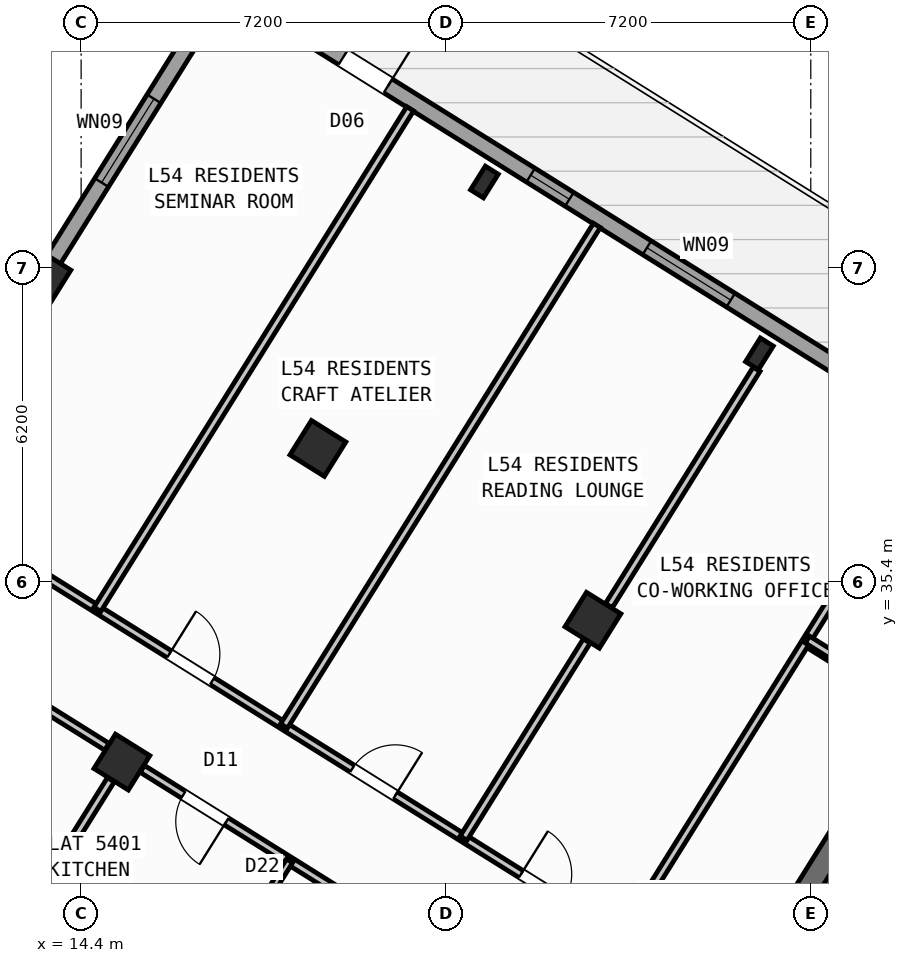
"""IFC4 building model, lengths in metres.
Left out: names, types, materials, properties, quantities, classifications, styles, units other than length and angle.
Written with IfcOpenShell. Run it as: python <this file> out.ifc"""

import sys

from ifc_helpers import new_model, si_unit, direction, frame, frame_2d, origin, origin_2d, place, context, subcontext, project, spatial, rectangle, hollow_rectangle, i_section, extrude, source, transform, mapped, element, fill, save


model = new_model("IFC4")
c1 = context("Model", 3, precision=1e-05, world=origin(), true_north=direction((0.0, 1.0)))
c2 = subcontext(c1, "Body", "Model", "MODEL_VIEW")
j1 = project(units=[si_unit("LENGTHUNIT", "METRE"), si_unit("PLANEANGLEUNIT", "RADIAN")], contexts=[c1])
p1 = place(None, origin())
s1 = spatial("IfcSite", under=j1, at=p1, CompositionType="ELEMENT")
p2 = place(p1, origin())
s2 = spatial("IfcBuilding", under=s1, at=p2, CompositionType="ELEMENT")
p3 = place(p2, frame((0.0, 0.0, 214.8)))
s3 = spatial("IfcBuildingStorey", under=s2, at=p3, CompositionType="ELEMENT", Elevation=214.8)
p4 = place(p3, frame((29.544, 30.636, 0.0), z_axis=(0.0, 0.0, 1.0), x_axis=(-0.529902075036, -0.848058836916, 0.0)))
e1 = element("IfcWall", 1, at=p4, inside=s3, PredefinedType="SHEAR", context=c2, shape_type="SweptSolid", body=[
    extrude(rectangle(XDim=3.625, YDim=0.45, at=frame_2d((1.812, 0.0))), origin(), (0.0, 0.0, 1.0), 3.35),
])
m1 = source(origin(), c2, "Body", "SweptSolid", [
    extrude(i_section(OverallWidth=0.3, OverallDepth=0.55, WebThickness=0.015, FlangeThickness=0.029, at=origin_2d()), origin(), (0.0, 0.0, 1.0), 3.6),
])
p5 = place(p3, frame((27.786, 39.901, 0.0), z_axis=(0.0, 0.0, 1.0), x_axis=(-0.848048096156, 0.529919264233, 0.0)))
e2 = element("IfcColumn", 2, at=p5, inside=s3, PredefinedType="COLUMN", context=c2, shape_type="MappedRepresentation", body=[
    mapped(m1, transform((0.0, 0.0, 0.0), scale=1.0)),
])
m2 = source(origin(), c2, "Body", "SweptSolid", [
    extrude(hollow_rectangle(XDim=0.8, YDim=0.8, WallThickness=0.032, at=origin_2d()), origin(), (0.0, 0.0, 1.0), 3.6),
])
p6 = place(p3, frame((24.5, 34.643, 0.0), z_axis=(0.0, 0.0, 1.0), x_axis=(-0.848048096156, 0.529919264233, 0.0)))
e3 = element("IfcColumn", 3, at=p6, inside=s3, PredefinedType="COLUMN", context=c2, shape_type="MappedRepresentation", body=[
    mapped(m2, transform((0.0, 0.0, 0.0), scale=1.0)),
])
p7 = place(p3, frame((22.358, 43.292, 0.0), z_axis=(0.0, 0.0, 1.0), x_axis=(-0.848048096156, 0.529919264233, 0.0)))
e4 = element("IfcColumn", 4, at=p7, inside=s3, PredefinedType="COLUMN", context=c2, shape_type="MappedRepresentation", body=[
    mapped(m1, transform((0.0, 0.0, 0.0), scale=1.0)),
])
for number, where, z_axis, x_axis in (
    (5, (19.073, 38.034, 0.0), (0.0, 0.0, 1.0), (-0.848, 0.53, 0.0)),
    (6, (15.205, 31.844, 0.0), (0.0, 0.0, 1.0), (-0.848, 0.53, 0.0)),
    (7, (13.646, 41.426, 0.0), (0.0, 0.0, 1.0), (-0.848, 0.53, 0.0)),
):
    element("IfcColumn", number, at=place(p3, frame(where, z_axis=z_axis, x_axis=x_axis)), inside=s3, PredefinedType="COLUMN", context=c2, shape_type="MappedRepresentation", body=[
        mapped(m2, transform((0.0, 0.0, 0.0), scale=1.0)),
    ])
p8 = place(p3, frame((5.7, 28.71, 0.0), z_axis=(0.0, 0.0, 1.0), x_axis=(0.529923711467, 0.8480453172, 0.0)))
e8 = element("IfcWall", 8, at=p8, inside=s3, PredefinedType="STANDARD", context=c2, shape_type="SweptSolid", body=[
    extrude(rectangle(XDim=21.587, YDim=0.32, at=frame_2d((10.794, 0.0))), origin(), (0.0, 0.0, 1.0), 2.825),
])
p9 = place(p8, frame((2.184, 0.0, 0.9)))
e9 = element("IfcOpeningElement", 9, at=p9, cuts=e8, PredefinedType="OPENING", context=c2, shape_type="SweptSolid", body=[
    extrude(rectangle(XDim=1.65, YDim=1.45, at=frame_2d((0.825, 0.725))), frame((0.0, 0.17, 0.0), z_axis=(0.0, -1.0, 0.0), x_axis=(1.0, 0.0, 0.0)), (0.0, 0.0, 1.0), 0.34),
])
p10 = place(p8, frame((11.709, 0.0, 0.9)))
e10 = element("IfcOpeningElement", 10, at=p10, cuts=e8, PredefinedType="OPENING", context=c2, shape_type="SweptSolid", body=[
    extrude(rectangle(XDim=1.35, YDim=1.45, at=frame_2d((0.675, 0.725))), frame((0.0, 0.17, 0.0), z_axis=(0.0, -1.0, 0.0), x_axis=(1.0, 0.0, 0.0)), (0.0, 0.0, 1.0), 0.34),
])
p11 = place(p8, frame((17.181, 0.0, 0.95)))
e11 = element("IfcOpeningElement", 11, at=p11, cuts=e8, PredefinedType="OPENING", context=c2, shape_type="SweptSolid", body=[
    extrude(rectangle(XDim=1.95, YDim=1.35, at=frame_2d((0.975, 0.675))), frame((0.0, 0.17, 0.0), z_axis=(0.0, -1.0, 0.0), x_axis=(1.0, 0.0, 0.0)), (0.0, 0.0, 1.0), 0.34),
])
p12 = place(p3, frame((17.424, 47.083, 0.0), z_axis=(0.0, 0.0, 1.0), x_axis=(0.848049927979, -0.529916332693, 0.0)))
e12 = element("IfcWall", 12, at=p12, inside=s3, PredefinedType="STANDARD", context=c2, shape_type="SweptSolid", body=[
    extrude(rectangle(XDim=29.223, YDim=0.32, at=frame_2d((14.612, 0.0))), origin(), (0.0, 0.0, 1.0), 3.35),
])
p13 = place(p12, frame((2.526, 0.0, 0.0)))
e13 = element("IfcOpeningElement", 13, at=p13, cuts=e12, PredefinedType="OPENING", context=c2, shape_type="SweptSolid", body=[
    extrude(rectangle(XDim=1.05, YDim=2.15, at=frame_2d((0.525, 1.075))), frame((0.0, 0.17, 0.0), z_axis=(0.0, -1.0, 0.0), x_axis=(1.0, 0.0, 0.0)), (0.0, 0.0, 1.0), 0.34),
])
p14 = place(p12, frame((0.653, 0.0, 0.9)))
e14 = element("IfcOpeningElement", 14, at=p14, cuts=e12, PredefinedType="OPENING", context=c2, shape_type="SweptSolid", body=[
    extrude(rectangle(XDim=1.35, YDim=1.45, at=frame_2d((0.675, 0.725))), frame((0.0, 0.17, 0.0), z_axis=(0.0, -1.0, 0.0), x_axis=(1.0, 0.0, 0.0)), (0.0, 0.0, 1.0), 0.34),
])
p15 = place(p12, frame((6.897, 0.0, 1.0)))
e15 = element("IfcOpeningElement", 15, at=p15, cuts=e12, PredefinedType="OPENING", context=c2, shape_type="SweptSolid", body=[
    extrude(rectangle(XDim=0.9, YDim=1.25, at=frame_2d((0.45, 0.625))), frame((0.0, 0.17, 0.0), z_axis=(0.0, -1.0, 0.0), x_axis=(1.0, 0.0, 0.0)), (0.0, 0.0, 1.0), 0.34),
])
p16 = place(p12, frame((9.602, 0.0, 0.95)))
e16 = element("IfcOpeningElement", 16, at=p16, cuts=e12, PredefinedType="OPENING", context=c2, shape_type="SweptSolid", body=[
    extrude(rectangle(XDim=1.95, YDim=1.35, at=frame_2d((0.975, 0.675))), frame((0.0, 0.17, 0.0), z_axis=(0.0, -1.0, 0.0), x_axis=(1.0, 0.0, 0.0)), (0.0, 0.0, 1.0), 0.34),
])
p17 = place(p12, frame((14.096, 0.0, 1.0)))
e17 = element("IfcOpeningElement", 17, at=p17, cuts=e12, PredefinedType="OPENING", context=c2, shape_type="SweptSolid", body=[
    extrude(rectangle(XDim=0.9, YDim=1.25, at=frame_2d((0.45, 0.625))), frame((0.0, 0.17, 0.0), z_axis=(0.0, -1.0, 0.0), x_axis=(1.0, 0.0, 0.0)), (0.0, 0.0, 1.0), 0.34),
])
p18 = place(p12, frame((17.254, 0.0, 1.0)))
e18 = element("IfcOpeningElement", 18, at=p18, cuts=e12, PredefinedType="OPENING", context=c2, shape_type="SweptSolid", body=[
    extrude(rectangle(XDim=0.9, YDim=1.25, at=frame_2d((0.45, 0.625))), frame((0.0, 0.17, 0.0), z_axis=(0.0, -1.0, 0.0), x_axis=(1.0, 0.0, 0.0)), (0.0, 0.0, 1.0), 0.34),
])
p19 = place(p12, frame((21.139, 0.0, 0.9)))
e19 = element("IfcOpeningElement", 19, at=p19, cuts=e12, PredefinedType="OPENING", context=c2, shape_type="SweptSolid", body=[
    extrude(rectangle(XDim=1.35, YDim=1.45, at=frame_2d((0.675, 0.725))), frame((0.0, 0.17, 0.0), z_axis=(0.0, -1.0, 0.0), x_axis=(1.0, 0.0, 0.0)), (0.0, 0.0, 1.0), 0.34),
])
p20 = place(p12, frame((25.778, 0.0, 0.9)))
e20 = element("IfcOpeningElement", 20, at=p20, cuts=e12, PredefinedType="OPENING", context=c2, shape_type="SweptSolid", body=[
    extrude(rectangle(XDim=1.35, YDim=1.45, at=frame_2d((0.675, 0.725))), frame((0.0, 0.17, 0.0), z_axis=(0.0, -1.0, 0.0), x_axis=(1.0, 0.0, 0.0)), (0.0, 0.0, 1.0), 0.34),
])
p21 = place(p3, frame((30.914, 32.829, 0.0), z_axis=(0.0, 0.0, 1.0), x_axis=(-0.848008813643, 0.529982124211, 0.0)))
e21 = element("IfcWall", 21, at=p21, inside=s3, PredefinedType="PARTITIONING", context=c2, shape_type="SweptSolid", body=[
    extrude(rectangle(XDim=2.61, YDim=0.16, at=frame_2d((1.305, 0.0))), origin(), (0.0, 0.0, 1.0), 3.34),
])
p22 = place(p3, frame((31.239, 38.274, 0.0), z_axis=(0.0, 0.0, 1.0), x_axis=(-0.529925472745, -0.848044216616, 0.0)))
e22 = element("IfcWall", 22, at=p22, inside=s3, PredefinedType="PARTITIONING", context=c2, shape_type="SweptSolid", body=[
    extrude(rectangle(XDim=11.65, YDim=0.16, at=frame_2d((5.825, 0.0))), origin(), (0.0, 0.0, 1.0), 3.34),
])
p23 = place(p3, frame((25.065, 28.394, 0.0), z_axis=(0.0, 0.0, 1.0), x_axis=(-0.848048310262, 0.529918921593, 0.0)))
e23 = element("IfcWall", 23, at=p23, inside=s3, PredefinedType="PARTITIONING", context=c2, shape_type="SweptSolid", body=[
    extrude(rectangle(XDim=16.73, YDim=0.16, at=frame_2d((8.365, 0.0))), origin(), (0.0, 0.0, 1.0), 3.34),
])
p24 = place(p23, frame((1.338, 0.0, 0.0)))
e24 = element("IfcOpeningElement", 24, at=p24, cuts=e23, PredefinedType="OPENING", context=c2, shape_type="SweptSolid", body=[
    extrude(rectangle(XDim=1.0, YDim=2.1, at=frame_2d((0.5, 1.05))), frame((0.0, 0.09, 0.0), z_axis=(0.0, -1.0, 0.0), x_axis=(1.0, 0.0, 0.0)), (0.0, 0.0, 1.0), 0.18),
])
p25 = place(p23, frame((5.265, 0.0, 0.0)))
e25 = element("IfcOpeningElement", 25, at=p25, cuts=e23, PredefinedType="OPENING", context=c2, shape_type="SweptSolid", body=[
    extrude(rectangle(XDim=1.0, YDim=2.1, at=frame_2d((0.5, 1.05))), frame((0.0, 0.09, 0.0), z_axis=(0.0, -1.0, 0.0), x_axis=(1.0, 0.0, 0.0)), (0.0, 0.0, 1.0), 0.18),
])
p26 = place(p23, frame((9.526, 0.0, 0.0)))
e26 = element("IfcOpeningElement", 26, at=p26, cuts=e23, PredefinedType="OPENING", context=c2, shape_type="SweptSolid", body=[
    extrude(rectangle(XDim=1.0, YDim=2.1, at=frame_2d((0.5, 1.05))), frame((0.0, 0.09, 0.0), z_axis=(0.0, -1.0, 0.0), x_axis=(1.0, 0.0, 0.0)), (0.0, 0.0, 1.0), 0.18),
])
p27 = place(p23, frame((13.954, 0.0, 0.0)))
e27 = element("IfcOpeningElement", 27, at=p27, cuts=e23, PredefinedType="OPENING", context=c2, shape_type="SweptSolid", body=[
    extrude(rectangle(XDim=1.0, YDim=2.1, at=frame_2d((0.5, 1.05))), frame((0.0, 0.09, 0.0), z_axis=(0.0, -1.0, 0.0), x_axis=(1.0, 0.0, 0.0)), (0.0, 0.0, 1.0), 0.18),
])
p28 = place(p3, frame((20.336, 28.755, 0.0), z_axis=(0.0, 0.0, 1.0), x_axis=(-0.848049955116, 0.529916289265, 0.0)))
e28 = element("IfcWall", 28, at=p28, inside=s3, PredefinedType="PARTITIONING", context=c2, shape_type="SweptSolid", body=[
    extrude(rectangle(XDim=5.576, YDim=0.16, at=frame_2d((2.788, 0.0))), origin(), (0.0, 0.0, 1.0), 2.825),
])
p29 = place(p28, frame((3.618, 0.0, 0.0)))
e29 = element("IfcOpeningElement", 29, at=p29, cuts=e28, PredefinedType="OPENING", context=c2, shape_type="SweptSolid", body=[
    extrude(rectangle(XDim=1.0, YDim=2.1, at=frame_2d((0.5, 1.05))), frame((0.0, 0.09, 0.0), z_axis=(0.0, -1.0, 0.0), x_axis=(1.0, 0.0, 0.0)), (0.0, 0.0, 1.0), 0.18),
])
p30 = place(p3, frame((14.908, 32.147, 0.0), z_axis=(0.0, 0.0, 1.0), x_axis=(-0.848049955116, 0.529916289265, 0.0)))
e30 = element("IfcWall", 30, at=p30, inside=s3, PredefinedType="PARTITIONING", context=c2, shape_type="SweptSolid", body=[
    extrude(rectangle(XDim=5.576, YDim=0.16, at=frame_2d((2.788, 0.0))), origin(), (0.0, 0.0, 1.0), 2.825),
])
p31 = place(p30, frame((4.158, 0.0, 0.0)))
e31 = element("IfcOpeningElement", 31, at=p31, cuts=e30, PredefinedType="OPENING", context=c2, shape_type="SweptSolid", body=[
    extrude(rectangle(XDim=1.0, YDim=2.1, at=frame_2d((0.5, 1.05))), frame((0.0, 0.09, 0.0), z_axis=(0.0, -1.0, 0.0), x_axis=(1.0, 0.0, 0.0)), (0.0, 0.0, 1.0), 0.18),
])
p32 = place(p3, frame((14.986, 31.494, 0.0), z_axis=(0.0, 0.0, 1.0), x_axis=(-0.529907440938, -0.848055484057, 0.0)))
e32 = element("IfcWall", 32, at=p32, inside=s3, PredefinedType="PARTITIONING", context=c2, shape_type="SweptSolid", body=[
    extrude(rectangle(XDim=6.476, YDim=0.16, at=frame_2d((3.238, 0.0))), origin(), (0.0, 0.0, 1.0), 2.825),
])
p33 = place(p3, frame((19.318, 26.349, 0.0), z_axis=(0.0, 0.0, 1.0), x_axis=(-0.848039019877, 0.529933789039, 0.0)))
e33 = element("IfcWall", 33, at=p33, inside=s3, PredefinedType="PLUMBINGWALL", context=c2, shape_type="SweptSolid", body=[
    extrude(rectangle(XDim=6.4, YDim=0.14, at=frame_2d((3.2, 0.0))), origin(), (0.0, 0.0, 1.0), 3.34),
])
p34 = place(p33, frame((2.824, 0.0, 0.0)))
e34 = element("IfcOpeningElement", 34, at=p34, cuts=e33, PredefinedType="OPENING", context=c2, shape_type="SweptSolid", body=[
    extrude(rectangle(XDim=0.78, YDim=2.05, at=frame_2d((0.39, 1.025))), frame((0.0, 0.08, 0.0), z_axis=(0.0, -1.0, 0.0), x_axis=(1.0, 0.0, 0.0)), (0.0, 0.0, 1.0), 0.16),
])
p35 = place(p3, frame((18.514, 29.894, 0.0), z_axis=(0.0, 0.0, 1.0), x_axis=(-0.529913878929, -0.848051461244, 0.0)))
e35 = element("IfcWall", 35, at=p35, inside=s3, PredefinedType="PLUMBINGWALL", context=c2, shape_type="SweptSolid", body=[
    extrude(rectangle(XDim=2.58, YDim=0.14, at=frame_2d((1.29, 0.0))), origin(), (0.0, 0.0, 1.0), 3.34),
])
p36 = place(p35, frame((0.9, 0.0, 0.0)))
e36 = element("IfcOpeningElement", 36, at=p36, cuts=e35, PredefinedType="OPENING", context=c2, shape_type="SweptSolid", body=[
    extrude(rectangle(XDim=0.78, YDim=2.05, at=frame_2d((0.39, 1.025))), frame((0.0, 0.08, 0.0), z_axis=(0.0, -1.0, 0.0), x_axis=(1.0, 0.0, 0.0)), (0.0, 0.0, 1.0), 0.16),
])
p37 = place(p3, frame((13.986, 29.893, 0.0), z_axis=(0.0, 0.0, 1.0), x_axis=(-0.848051346257, 0.52991406295, 0.0)))
e37 = element("IfcWall", 37, at=p37, inside=s3, PredefinedType="PLUMBINGWALL", context=c2, shape_type="SweptSolid", body=[
    extrude(rectangle(XDim=3.62, YDim=0.14, at=frame_2d((1.81, 0.0))), origin(), (0.0, 0.0, 1.0), 3.34),
])
p38 = place(p3, frame((27.73, 39.597, 0.0), z_axis=(0.0, 0.0, 1.0), x_axis=(-0.529919150083, -0.848048167486, 0.0)))
e38 = element("IfcWall", 38, at=p38, inside=s3, PredefinedType="PARTITIONING", context=c2, shape_type="SweptSolid", body=[
    extrude(rectangle(XDim=5.501, YDim=0.16, at=frame_2d((2.75, 0.0))), origin(), (0.0, 0.0, 1.0), 2.825),
])
p39 = place(p3, frame((24.379, 34.233, 0.0), z_axis=(0.0, 0.0, 1.0), x_axis=(-0.529922402838, -0.84804613493, 0.0)))
e39 = element("IfcWall", 39, at=p39, inside=s3, PredefinedType="PARTITIONING", context=c2, shape_type="SweptSolid", body=[
    extrude(rectangle(XDim=4.588, YDim=0.16, at=frame_2d((2.294, 0.0))), origin(), (0.0, 0.0, 1.0), 2.825),
])
for number, where, z_axis, x_axis in (
    (40, (24.578, 42.436, 0.0), (0.0, 0.0, 1.0), (-0.53, -0.848, 0.0)),
    (41, (20.894, 44.738, 0.0), (0.0, 0.0, 1.0), (-0.53, -0.848, 0.0)),
):
    element("IfcWall", number, at=place(p3, frame(where, z_axis=z_axis, x_axis=x_axis)), inside=s3, PredefinedType="PARTITIONING", context=c2, shape_type="SweptSolid", body=[
        extrude(rectangle(XDim=11.65, YDim=0.16, at=frame_2d((5.825, 0.0))), origin(), (0.0, 0.0, 1.0), 2.995),
    ])
p40 = place(p3, frame((41.936, 26.012, 0.0), z_axis=(0.0, 0.0, 1.0), x_axis=(-0.848051154596, 0.529914369676, 0.0)))
e42 = element("IfcWall", 42, at=p40, inside=s3, PredefinedType="PARTITIONING", context=c2, shape_type="SweptSolid", body=[
    extrude(rectangle(XDim=15.57, YDim=0.16, at=frame_2d((7.785, 0.0))), origin(), (0.0, 0.0, 1.0), 3.34),
])
p41 = place(p40, frame((10.83, 0.0, 0.0)))
e43 = element("IfcOpeningElement", 43, at=p41, cuts=e42, PredefinedType="OPENING", context=c2, shape_type="SweptSolid", body=[
    extrude(rectangle(XDim=1.0, YDim=2.1, at=frame_2d((0.5, 1.05))), frame((0.0, 0.09, 0.0), z_axis=(0.0, -1.0, 0.0), x_axis=(1.0, 0.0, 0.0)), (0.0, 0.0, 1.0), 0.18),
])
m3 = source(origin(), c2, "Body", "SweptSolid", [
    extrude(rectangle(XDim=1.05, YDim=2.15, at=frame_2d((0.525, 1.075))), frame((0.0, 0.025, 0.0), z_axis=(0.0, -1.0, 0.0), x_axis=(1.0, 0.0, 0.0)), (0.0, 0.0, 1.0), 0.05),
])
p42 = place(p13, origin())
e44 = element("IfcDoor", 44, at=p42, inside=s3, OperationType="SINGLE_SWING_RIGHT", PredefinedType="DOOR", context=c2, shape_type="MappedRepresentation", body=[
    mapped(m3, transform((0.0, 0.0, 0.0), scale=1.0)),
])
fill(e13, e44)
m4 = source(origin(), c2, "Body", "SweptSolid", [
    extrude(rectangle(XDim=1.95, YDim=1.35, at=frame_2d((0.975, 0.675))), frame((0.0, 0.03, 0.0), z_axis=(0.0, -1.0, 0.0), x_axis=(1.0, 0.0, 0.0)), (0.0, 0.0, 1.0), 0.06),
])
p43 = place(p11, origin())
e45 = element("IfcWindow", 45, at=p43, inside=s3, PartitioningType="SINGLE_PANEL", PredefinedType="WINDOW", context=c2, shape_type="MappedRepresentation", body=[
    mapped(m4, transform((0.0, 0.0, 0.0), scale=1.0)),
])
fill(e11, e45)
m5 = source(origin(), c2, "Body", "SweptSolid", [
    extrude(rectangle(XDim=0.9, YDim=1.25, at=frame_2d((0.45, 0.625))), frame((0.0, 0.03, 0.0), z_axis=(0.0, -1.0, 0.0), x_axis=(1.0, 0.0, 0.0)), (0.0, 0.0, 1.0), 0.06),
])
p44 = place(p15, origin())
e46 = element("IfcWindow", 46, at=p44, inside=s3, PartitioningType="SINGLE_PANEL", PredefinedType="WINDOW", context=c2, shape_type="MappedRepresentation", body=[
    mapped(m5, transform((0.0, 0.0, 0.0), scale=1.0)),
])
fill(e15, e46)
p45 = place(p16, origin())
e47 = element("IfcWindow", 47, at=p45, inside=s3, PartitioningType="SINGLE_PANEL", PredefinedType="WINDOW", context=c2, shape_type="MappedRepresentation", body=[
    mapped(m4, transform((0.0, 0.0, 0.0), scale=1.0)),
])
fill(e16, e47)
m6 = source(origin(), c2, "Body", "SweptSolid", [
    extrude(rectangle(XDim=1.0, YDim=2.1, at=frame_2d((0.5, 1.05))), frame((0.0, 0.025, 0.0), z_axis=(0.0, -1.0, 0.0), x_axis=(1.0, 0.0, 0.0)), (0.0, 0.0, 1.0), 0.05),
])
p46 = place(p29, origin())
e48 = element("IfcDoor", 48, at=p46, inside=s3, OperationType="SINGLE_SWING_LEFT", PredefinedType="DOOR", context=c2, shape_type="MappedRepresentation", body=[
    mapped(m6, transform((0.0, 0.0, 0.0), scale=1.0)),
])
fill(e29, e48)
p47 = place(p24, frame((1.0, 0.0, 0.0), z_axis=(0.0, 0.0, 1.0), x_axis=(-1.0, 0.0, 0.0)))
e49 = element("IfcDoor", 49, at=p47, inside=s3, OperationType="SINGLE_SWING_LEFT", PredefinedType="DOOR", context=c2, shape_type="MappedRepresentation", body=[
    mapped(m6, transform((0.0, 0.0, 0.0), scale=1.0)),
])
fill(e24, e49)
p48 = place(p25, frame((1.0, 0.0, 0.0), z_axis=(0.0, 0.0, 1.0), x_axis=(-1.0, 0.0, 0.0)))
e50 = element("IfcDoor", 50, at=p48, inside=s3, OperationType="SINGLE_SWING_RIGHT", PredefinedType="DOOR", context=c2, shape_type="MappedRepresentation", body=[
    mapped(m6, transform((0.0, 0.0, 0.0), scale=1.0)),
])
fill(e25, e50)
p49 = place(p26, frame((1.0, 0.0, 0.0), z_axis=(0.0, 0.0, 1.0), x_axis=(-1.0, 0.0, 0.0)))
e51 = element("IfcDoor", 51, at=p49, inside=s3, OperationType="SINGLE_SWING_LEFT", PredefinedType="DOOR", context=c2, shape_type="MappedRepresentation", body=[
    mapped(m6, transform((0.0, 0.0, 0.0), scale=1.0)),
])
fill(e26, e51)
save(model, sys.argv[1])
